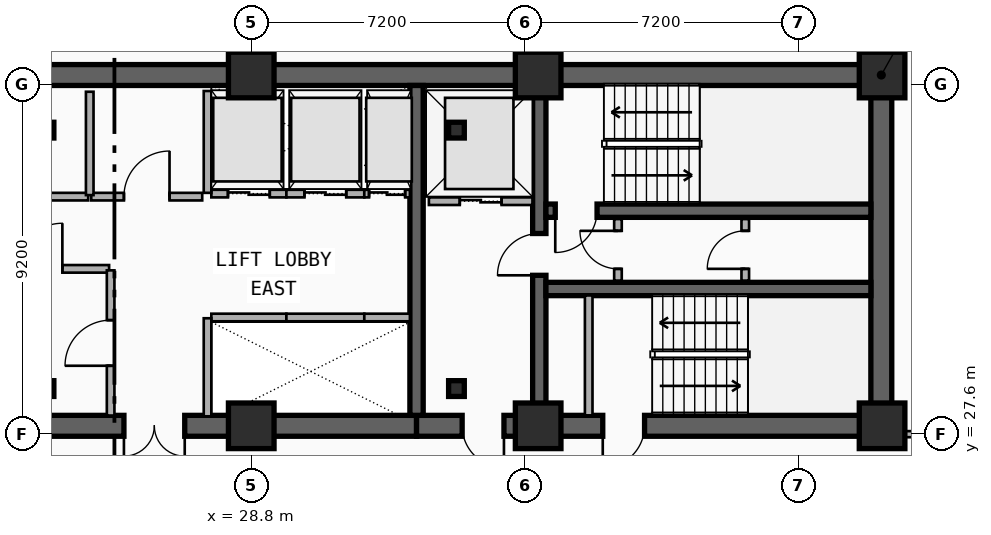
"""IFC4 building model, lengths in metres.
Left out: names, types, materials, properties, quantities, classifications, styles, units other than length and angle.
Written with IfcOpenShell. Run it as: python <this file> out.ifc"""

import sys

from ifc_helpers import new_model, si_unit, direction, frame, frame_2d, origin, origin_2d, place, context, subcontext, project, spatial, rectangle, i_section, extrude, element, fill, save


model = new_model("IFC4")
c1 = context("Model", 3, precision=1e-05, world=origin(), true_north=direction((0.0, 1.0)))
c2 = subcontext(c1, "Body", "Model", "MODEL_VIEW")
j1 = project(units=[si_unit("LENGTHUNIT", "METRE"), si_unit("PLANEANGLEUNIT", "RADIAN")], contexts=[c1])
p1 = place(None, origin())
s1 = spatial("IfcSite", under=j1, at=p1, CompositionType="ELEMENT")
p2 = place(p1, origin())
s2 = spatial("IfcBuilding", under=s1, at=p2, CompositionType="ELEMENT")
p3 = place(p2, frame((0.0, 0.0, 169.65)))
s3 = spatial("IfcBuildingStorey", under=s2, at=p3, CompositionType="ELEMENT", Elevation=169.65)
p4 = place(p3, frame((12.15, 37.05, 0.0), z_axis=(0.0, 0.0, 1.0), x_axis=(1.0, 0.0, 0.0)))
e1 = element("IfcWall", 1, at=p4, inside=s3, PredefinedType="SHEAR", context=c2, shape_type="SweptSolid", body=[
    extrude(rectangle(XDim=33.23, YDim=0.55, at=frame_2d((16.615, 0.0))), origin(), (0.0, 0.0, 1.0), 3.55),
])
p5 = place(p3, frame((33.15, 27.82, 0.0), z_axis=(0.0, 0.0, 1.0), x_axis=(-1.0, 0.0, 0.0)))
e2 = element("IfcWall", 2, at=p5, inside=s3, PredefinedType="SHEAR", context=c2, shape_type="SweptSolid", body=[
    extrude(rectangle(XDim=11.97, YDim=0.55, at=frame_2d((5.985, 0.0))), origin(), (0.0, 0.0, 1.0), 3.55),
])
p6 = place(p5, frame((6.1, 0.0, 0.0)))
e3 = element("IfcOpeningElement", 3, at=p6, cuts=e2, PredefinedType="OPENING", context=c2, shape_type="SweptSolid", body=[
    extrude(rectangle(XDim=1.6, YDim=2.2, at=frame_2d((0.8, 1.1))), frame((0.0, 0.285, 0.0), z_axis=(0.0, -1.0, 0.0), x_axis=(1.0, 0.0, 0.0)), (0.0, 0.0, 1.0), 0.57),
])
p7 = place(p3, frame((45.38, 27.82, 0.0), z_axis=(0.0, 0.0, 1.0), x_axis=(-1.0, 0.0, 0.0)))
e4 = element("IfcWall", 4, at=p7, inside=s3, PredefinedType="SHEAR", context=c2, shape_type="SweptSolid", body=[
    extrude(rectangle(XDim=12.23, YDim=0.55, at=frame_2d((6.115, 0.0))), origin(), (0.0, 0.0, 1.0), 3.55),
])
p8 = place(p7, frame((9.93, 0.0, 0.0)))
e5 = element("IfcOpeningElement", 5, at=p8, cuts=e4, PredefinedType="OPENING", context=c2, shape_type="SweptSolid", body=[
    extrude(rectangle(XDim=1.1, YDim=2.15, at=frame_2d((0.55, 1.075))), frame((0.0, 0.285, 0.0), z_axis=(0.0, -1.0, 0.0), x_axis=(1.0, 0.0, 0.0)), (0.0, 0.0, 1.0), 0.57),
])
p9 = place(p7, frame((6.23, 0.0, 0.0)))
e6 = element("IfcOpeningElement", 6, at=p9, cuts=e4, PredefinedType="OPENING", context=c2, shape_type="SweptSolid", body=[
    extrude(rectangle(XDim=1.1, YDim=2.15, at=frame_2d((0.55, 1.075))), frame((0.0, 0.285, 0.0), z_axis=(0.0, -1.0, 0.0), x_axis=(1.0, 0.0, 0.0)), (0.0, 0.0, 1.0), 0.57),
])
p10 = place(p3, frame((45.38, 28.095, 0.0), z_axis=(0.0, 0.0, 1.0), x_axis=(0.0, 1.0, 0.0)))
e7 = element("IfcWall", 7, at=p10, inside=s3, PredefinedType="SHEAR", context=c2, shape_type="SweptSolid", body=[
    extrude(rectangle(XDim=8.68, YDim=0.55, at=frame_2d((4.34, 0.0))), origin(), (0.0, 0.0, 1.0), 3.55),
])
p11 = place(p3, frame((33.15, 28.095, 0.0), z_axis=(0.0, 0.0, 1.0), x_axis=(0.0, 1.0, 0.0)))
e8 = element("IfcWall", 8, at=p11, inside=s3, PredefinedType="SHEAR", context=c2, shape_type="SweptSolid", body=[
    extrude(rectangle(XDim=8.68, YDim=0.35, at=frame_2d((4.34, 0.0))), origin(), (0.0, 0.0, 1.0), 3.55),
])
p12 = place(p3, frame((36.38, 28.095, 0.0), z_axis=(0.0, 0.0, 1.0), x_axis=(0.0, 1.0, 0.0)))
e9 = element("IfcWall", 9, at=p12, inside=s3, PredefinedType="SHEAR", context=c2, shape_type="SweptSolid", body=[
    extrude(rectangle(XDim=8.68, YDim=0.35, at=frame_2d((4.34, 0.0))), origin(), (0.0, 0.0, 1.0), 3.55),
])
p13 = place(p12, frame((3.685, 0.0, 0.0)))
e10 = element("IfcOpeningElement", 10, at=p13, cuts=e9, PredefinedType="OPENING", context=c2, shape_type="SweptSolid", body=[
    extrude(rectangle(XDim=1.1, YDim=2.15, at=frame_2d((0.55, 1.075))), frame((0.0, 0.185, 0.0), z_axis=(0.0, -1.0, 0.0), x_axis=(1.0, 0.0, 0.0)), (0.0, 0.0, 1.0), 0.37),
])
p14 = place(p3, frame((45.105, 33.48, 0.0), z_axis=(0.0, 0.0, 1.0), x_axis=(-1.0, 0.0, 0.0)))
e11 = element("IfcWall", 11, at=p14, inside=s3, PredefinedType="SHEAR", context=c2, shape_type="SweptSolid", body=[
    extrude(rectangle(XDim=8.55, YDim=0.35, at=frame_2d((4.275, 0.0))), origin(), (0.0, 0.0, 1.0), 3.55),
])
p15 = place(p14, frame((7.205, 0.0, 0.0)))
e12 = element("IfcOpeningElement", 12, at=p15, cuts=e11, PredefinedType="OPENING", context=c2, shape_type="SweptSolid", body=[
    extrude(rectangle(XDim=1.1, YDim=2.15, at=frame_2d((0.55, 1.075))), frame((0.0, 0.185, 0.0), z_axis=(0.0, -1.0, 0.0), x_axis=(1.0, 0.0, 0.0)), (0.0, 0.0, 1.0), 0.37),
])
p16 = place(p3, frame((36.555, 31.42, 0.0), z_axis=(0.0, 0.0, 1.0), x_axis=(1.0, 0.0, 0.0)))
e13 = element("IfcWall", 13, at=p16, inside=s3, PredefinedType="SHEAR", context=c2, shape_type="SweptSolid", body=[
    extrude(rectangle(XDim=8.55, YDim=0.35, at=frame_2d((4.275, 0.0))), origin(), (0.0, 0.0, 1.0), 3.55),
])
for number, where, z_axis, x_axis in (
    (14, (23.4, 28.8, 0.0), (0.0, 0.0, 1.0), (1.0, 0.0, 0.0)),
    (15, (34.2, 28.8, 0.0), (0.0, 0.0, 1.0), (1.0, 0.0, 0.0)),
    (16, (34.2, 35.6, 0.0), (0.0, 0.0, 1.0), (1.0, 0.0, 0.0)),
    (17, (23.4, 35.6, 0.0), (0.0, 0.0, 1.0), (1.0, 0.0, 0.0)),
):
    element("IfcColumn", number, at=place(p3, frame(where, z_axis=z_axis, x_axis=x_axis)), inside=s3, PredefinedType="COLUMN", context=c2, shape_type="SweptSolid", body=[
        extrude(i_section(OverallWidth=0.413, OverallDepth=0.415, WebThickness=0.03, FlangeThickness=0.047, FilletRadius=0.015, at=origin_2d()), origin(), (0.0, 0.0, 1.0), 3.55),
    ])
for number, where, z_axis, x_axis in (
    (18, (28.8, 27.82, 0.0), (0.0, 0.0, 1.0), (1.0, 0.0, 0.0)),
    (19, (28.8, 37.05, 0.0), (0.0, 0.0, 1.0), (1.0, 0.0, 0.0)),
    (20, (36.35, 27.82, 0.0), (0.0, 0.0, 1.0), (1.0, 0.0, 0.0)),
    (21, (36.35, 37.05, 0.0), (0.0, 0.0, 1.0), (1.0, 0.0, 0.0)),
    (22, (45.4, 27.82, 0.0), (0.0, 0.0, 1.0), (1.0, 0.0, 0.0)),
    (23, (45.4, 37.05, 0.0), (0.0, 0.0, 1.0), (1.0, 0.0, 0.0)),
):
    element("IfcColumn", number, at=place(p3, frame(where, z_axis=z_axis, x_axis=x_axis)), inside=s3, PredefinedType="COLUMN", context=c2, shape_type="SweptSolid", body=[
        extrude(rectangle(XDim=1.2, YDim=1.2, at=origin_2d()), origin(), (0.0, 0.0, 1.0), 3.55),
    ])
p17 = place(p3, frame((33.475, 33.73, 0.0), z_axis=(0.0, 0.0, 1.0), x_axis=(1.0, 0.0, 0.0)))
e24 = element("IfcWall", 24, at=p17, inside=s3, PredefinedType="PARTITIONING", context=c2, shape_type="SweptSolid", body=[
    extrude(rectangle(XDim=2.725, YDim=0.2, at=frame_2d((1.362, 0.0))), origin(), (0.0, 0.0, 1.0), 2.36),
])
p18 = place(p17, frame((0.812, 0.0, 0.0)))
e25 = element("IfcOpeningElement", 25, at=p18, cuts=e24, PredefinedType="OPENING", context=c2, shape_type="SweptSolid", body=[
    extrude(rectangle(XDim=1.1, YDim=2.15, at=frame_2d((0.55, 1.075))), frame((0.0, 0.11, 0.0), z_axis=(0.0, -1.0, 0.0), x_axis=(1.0, 0.0, 0.0)), (0.0, 0.0, 1.0), 0.22),
])
p19 = place(p3, frame((27.75, 30.67, 0.0), z_axis=(0.0, 0.0, 1.0), x_axis=(1.0, 0.0, 0.0)))
e26 = element("IfcWall", 26, at=p19, inside=s3, PredefinedType="PARTITIONING", context=c2, shape_type="SweptSolid", body=[
    extrude(rectangle(XDim=1.975, YDim=0.2, at=frame_2d((0.988, 0.0))), origin(), (0.0, 0.0, 1.0), 2.36),
])
p20 = place(p3, frame((27.65, 28.07, 0.0), z_axis=(0.0, 0.0, 1.0), x_axis=(0.0, 1.0, 0.0)))
e27 = element("IfcWall", 27, at=p20, inside=s3, PredefinedType="PARTITIONING", context=c2, shape_type="SweptSolid", body=[
    extrude(rectangle(XDim=2.58, YDim=0.2, at=frame_2d((1.29, 0.0))), origin(), (0.0, 0.0, 1.0), 2.36),
])
p21 = place(p3, frame((29.725, 30.67, 0.0), z_axis=(0.0, 0.0, 1.0), x_axis=(1.0, 0.0, 0.0)))
e28 = element("IfcWall", 28, at=p21, inside=s3, PredefinedType="PARTITIONING", context=c2, shape_type="SweptSolid", body=[
    extrude(rectangle(XDim=2.05, YDim=0.2, at=frame_2d((1.025, 0.0))), origin(), (0.0, 0.0, 1.0), 2.67),
])
p22 = place(p3, frame((31.775, 30.67, 0.0), z_axis=(0.0, 0.0, 1.0), x_axis=(1.0, 0.0, 0.0)))
e29 = element("IfcWall", 29, at=p22, inside=s3, PredefinedType="PARTITIONING", context=c2, shape_type="SweptSolid", body=[
    extrude(rectangle(XDim=1.2, YDim=0.2, at=frame_2d((0.6, 0.0))), origin(), (0.0, 0.0, 1.0), 2.67),
])
p23 = place(p3, frame((27.75, 33.93, 0.0), z_axis=(0.0, 0.0, 1.0), x_axis=(1.0, 0.0, 0.0)))
e30 = element("IfcWall", 30, at=p23, inside=s3, PredefinedType="PARTITIONING", context=c2, shape_type="SweptSolid", body=[
    extrude(rectangle(XDim=1.975, YDim=0.2, at=frame_2d((0.988, 0.0))), origin(), (0.0, 0.0, 1.0), 2.36),
])
p24 = place(p23, frame((0.438, 0.0, 0.0)))
e31 = element("IfcOpeningElement", 31, at=p24, cuts=e30, PredefinedType="OPENING", context=c2, shape_type="SweptSolid", body=[
    extrude(rectangle(XDim=1.1, YDim=2.15, at=frame_2d((0.55, 1.075))), frame((0.0, 0.11, 0.0), z_axis=(0.0, -1.0, 0.0), x_axis=(1.0, 0.0, 0.0)), (0.0, 0.0, 1.0), 0.22),
])
p25 = place(p3, frame((27.65, 33.95, 0.0), z_axis=(0.0, 0.0, 1.0), x_axis=(0.0, 1.0, 0.0)))
e32 = element("IfcWall", 32, at=p25, inside=s3, PredefinedType="PARTITIONING", context=c2, shape_type="SweptSolid", body=[
    extrude(rectangle(XDim=2.68, YDim=0.2, at=frame_2d((1.34, 0.0))), origin(), (0.0, 0.0, 1.0), 2.36),
])
p26 = place(p3, frame((29.725, 33.93, 0.0), z_axis=(0.0, 0.0, 1.0), x_axis=(1.0, 0.0, 0.0)))
e33 = element("IfcWall", 33, at=p26, inside=s3, PredefinedType="PARTITIONING", context=c2, shape_type="SweptSolid", body=[
    extrude(rectangle(XDim=2.05, YDim=0.2, at=frame_2d((1.025, 0.0))), origin(), (0.0, 0.0, 1.0), 3.29),
])
p27 = place(p26, frame((0.475, 0.0, 0.0)))
e34 = element("IfcOpeningElement", 34, at=p27, cuts=e33, PredefinedType="OPENING", context=c2, shape_type="SweptSolid", body=[
    extrude(rectangle(XDim=1.1, YDim=2.15, at=frame_2d((0.55, 1.075))), frame((0.0, 0.11, 0.0), z_axis=(0.0, -1.0, 0.0), x_axis=(1.0, 0.0, 0.0)), (0.0, 0.0, 1.0), 0.22),
])
p28 = place(p3, frame((31.775, 33.93, 0.0), z_axis=(0.0, 0.0, 1.0), x_axis=(1.0, 0.0, 0.0)))
e35 = element("IfcWall", 35, at=p28, inside=s3, PredefinedType="PARTITIONING", context=c2, shape_type="SweptSolid", body=[
    extrude(rectangle(XDim=1.2, YDim=0.2, at=frame_2d((0.6, 0.0))), origin(), (0.0, 0.0, 1.0), 3.29),
])
p29 = place(p28, frame((0.125, 0.0, 0.0)))
e36 = element("IfcOpeningElement", 36, at=p29, cuts=e35, PredefinedType="OPENING", context=c2, shape_type="SweptSolid", body=[
    extrude(rectangle(XDim=0.95, YDim=2.15, at=frame_2d((0.475, 1.075))), frame((0.0, 0.11, 0.0), z_axis=(0.0, -1.0, 0.0), x_axis=(1.0, 0.0, 0.0)), (0.0, 0.0, 1.0), 0.22),
])
p30 = place(p3, frame((37.68, 28.095, 0.0), z_axis=(0.0, 0.0, 1.0), x_axis=(0.0, 1.0, 0.0)))
e37 = element("IfcWall", 37, at=p30, inside=s3, PredefinedType="PARTITIONING", context=c2, shape_type="SweptSolid", body=[
    extrude(rectangle(XDim=3.155, YDim=0.2, at=frame_2d((1.578, 0.0))), origin(), (0.0, 0.0, 1.0), 2.67),
])
p31 = place(p3, frame((38.45, 31.64, 0.0), z_axis=(0.0, 0.0, 1.0), x_axis=(0.0, 1.0, 0.0)))
e38 = element("IfcWall", 38, at=p31, inside=s3, PredefinedType="PARTITIONING", context=c2, shape_type="SweptSolid", body=[
    extrude(rectangle(XDim=1.62, YDim=0.2, at=frame_2d((0.81, 0.0))), origin(), (0.0, 0.0, 1.0), 3.29),
])
p32 = place(p31, frame((0.31, 0.0, 0.0)))
e39 = element("IfcOpeningElement", 39, at=p32, cuts=e38, PredefinedType="OPENING", context=c2, shape_type="SweptSolid", body=[
    extrude(rectangle(XDim=1.0, YDim=2.15, at=frame_2d((0.5, 1.075))), frame((0.0, 0.11, 0.0), z_axis=(0.0, -1.0, 0.0), x_axis=(1.0, 0.0, 0.0)), (0.0, 0.0, 1.0), 0.22),
])
p33 = place(p3, frame((41.8, 31.64, 0.0), z_axis=(0.0, 0.0, 1.0), x_axis=(0.0, 1.0, 0.0)))
e40 = element("IfcWall", 40, at=p33, inside=s3, PredefinedType="PARTITIONING", context=c2, shape_type="SweptSolid", body=[
    extrude(rectangle(XDim=1.62, YDim=0.2, at=frame_2d((0.81, 0.0))), origin(), (0.0, 0.0, 1.0), 3.29),
])
p34 = place(p33, frame((0.31, 0.0, 0.0)))
e41 = element("IfcOpeningElement", 41, at=p34, cuts=e40, PredefinedType="OPENING", context=c2, shape_type="SweptSolid", body=[
    extrude(rectangle(XDim=1.0, YDim=2.15, at=frame_2d((0.5, 1.075))), frame((0.0, 0.11, 0.0), z_axis=(0.0, -1.0, 0.0), x_axis=(1.0, 0.0, 0.0)), (0.0, 0.0, 1.0), 0.22),
])
p35 = place(p3, frame((21.4, 31.95, 0.0), z_axis=(0.0, 0.0, 1.0), x_axis=(1.0, 0.0, 0.0)))
e42 = element("IfcWall", 42, at=p35, inside=s3, PredefinedType="PARTITIONING", context=c2, shape_type="SweptSolid", body=[
    extrude(rectangle(XDim=3.66, YDim=0.2, at=frame_2d((1.83, 0.0))), origin(), (0.0, 0.0, 1.0), 2.36),
])
p36 = place(p35, frame((1.23, 0.0, 0.0)))
e43 = element("IfcOpeningElement", 43, at=p36, cuts=e42, PredefinedType="OPENING", context=c2, shape_type="SweptSolid", body=[
    extrude(rectangle(XDim=1.2, YDim=2.15, at=frame_2d((0.6, 1.075))), frame((0.0, 0.11, 0.0), z_axis=(0.0, -1.0, 0.0), x_axis=(1.0, 0.0, 0.0)), (0.0, 0.0, 1.0), 0.22),
])
p37 = place(p3, frame((21.59, 33.85, 0.0), z_axis=(0.0, 0.0, 1.0), x_axis=(1.0, 0.0, 0.0)))
e44 = element("IfcWall", 44, at=p37, inside=s3, PredefinedType="PARTITIONING", context=c2, shape_type="SweptSolid", body=[
    extrude(rectangle(XDim=2.92, YDim=0.2, at=frame_2d((1.46, 0.0))), origin(), (0.0, 0.0, 1.0), 2.36),
])
p38 = place(p37, frame((0.2, 0.0, 0.0)))
e45 = element("IfcOpeningElement", 45, at=p38, cuts=e44, PredefinedType="OPENING", context=c2, shape_type="SweptSolid", body=[
    extrude(rectangle(XDim=1.2, YDim=2.15, at=frame_2d((0.6, 1.075))), frame((0.0, 0.11, 0.0), z_axis=(0.0, -1.0, 0.0), x_axis=(1.0, 0.0, 0.0)), (0.0, 0.0, 1.0), 0.22),
])
p39 = place(p3, frame((24.59, 33.85, 0.0), z_axis=(0.0, 0.0, 1.0), x_axis=(1.0, 0.0, 0.0)))
e46 = element("IfcWall", 46, at=p39, inside=s3, PredefinedType="PARTITIONING", context=c2, shape_type="SweptSolid", body=[
    extrude(rectangle(XDim=2.92, YDim=0.2, at=frame_2d((1.46, 0.0))), origin(), (0.0, 0.0, 1.0), 3.29),
])
p40 = place(p39, frame((0.86, 0.0, 0.0)))
e47 = element("IfcOpeningElement", 47, at=p40, cuts=e46, PredefinedType="OPENING", context=c2, shape_type="SweptSolid", body=[
    extrude(rectangle(XDim=1.2, YDim=2.15, at=frame_2d((0.6, 1.075))), frame((0.0, 0.11, 0.0), z_axis=(0.0, -1.0, 0.0), x_axis=(1.0, 0.0, 0.0)), (0.0, 0.0, 1.0), 0.22),
])
p41 = place(p3, frame((25.1, 28.09, 0.0), z_axis=(0.0, 0.0, 1.0), x_axis=(0.0, 1.0, 0.0)))
e48 = element("IfcWall", 48, at=p41, inside=s3, PredefinedType="PARTITIONING", context=c2, shape_type="SweptSolid", body=[
    extrude(rectangle(XDim=3.82, YDim=0.2, at=frame_2d((1.91, 0.0))), origin(), (0.0, 0.0, 1.0), 2.67),
])
p42 = place(p41, frame((1.31, 0.0, 0.0)))
e49 = element("IfcOpeningElement", 49, at=p42, cuts=e48, PredefinedType="OPENING", context=c2, shape_type="SweptSolid", body=[
    extrude(rectangle(XDim=1.2, YDim=2.15, at=frame_2d((0.6, 1.075))), frame((0.0, 0.11, 0.0), z_axis=(0.0, -1.0, 0.0), x_axis=(1.0, 0.0, 0.0)), (0.0, 0.0, 1.0), 0.22),
])
p43 = place(p3, frame((24.55, 33.89, 0.0), z_axis=(0.0, 0.0, 1.0), x_axis=(0.0, 1.0, 0.0)))
e50 = element("IfcWall", 50, at=p43, inside=s3, PredefinedType="PARTITIONING", context=c2, shape_type="SweptSolid", body=[
    extrude(rectangle(XDim=2.72, YDim=0.2, at=frame_2d((1.36, 0.0))), origin(), (0.0, 0.0, 1.0), 3.29),
])
p44 = place(p3, frame((45.41, 27.6, 0.0), z_axis=(0.0, 0.0, 1.0), x_axis=(1.0, 0.0, 0.0)))
e51 = element("IfcWall", 51, at=p44, inside=s3, PredefinedType="PARTITIONING", context=c2, shape_type="SweptSolid", body=[
    extrude(rectangle(XDim=0.91, YDim=0.16, at=frame_2d((0.455, 0.0))), origin(), (0.0, 0.0, 1.0), 2.36),
])
p45 = place(p18, origin())
e52 = element("IfcDoor", 52, at=p45, inside=s3, OperationType="DOUBLE_DOOR_SLIDING", PredefinedType="DOOR", context=c2, shape_type="SweptSolid", body=[
    extrude(rectangle(XDim=1.1, YDim=2.15, at=frame_2d((0.55, 1.075))), frame((0.0, 0.025, 0.0), z_axis=(0.0, -1.0, 0.0), x_axis=(1.0, 0.0, 0.0)), (0.0, 0.0, 1.0), 0.05),
])
fill(e25, e52)
p46 = place(p24, origin())
e53 = element("IfcDoor", 53, at=p46, inside=s3, OperationType="DOUBLE_DOOR_SLIDING", PredefinedType="DOOR", context=c2, shape_type="SweptSolid", body=[
    extrude(rectangle(XDim=1.1, YDim=2.15, at=frame_2d((0.55, 1.075))), frame((0.0, 0.025, 0.0), z_axis=(0.0, -1.0, 0.0), x_axis=(1.0, 0.0, 0.0)), (0.0, 0.0, 1.0), 0.05),
])
fill(e31, e53)
p47 = place(p27, origin())
e54 = element("IfcDoor", 54, at=p47, inside=s3, OperationType="DOUBLE_DOOR_SLIDING", PredefinedType="DOOR", context=c2, shape_type="SweptSolid", body=[
    extrude(rectangle(XDim=1.1, YDim=2.15, at=frame_2d((0.55, 1.075))), frame((0.0, 0.025, 0.0), z_axis=(0.0, -1.0, 0.0), x_axis=(1.0, 0.0, 0.0)), (0.0, 0.0, 1.0), 0.05),
])
fill(e34, e54)
p48 = place(p29, origin())
e55 = element("IfcDoor", 55, at=p48, inside=s3, OperationType="DOUBLE_DOOR_SLIDING", PredefinedType="DOOR", context=c2, shape_type="SweptSolid", body=[
    extrude(rectangle(XDim=0.95, YDim=2.15, at=frame_2d((0.475, 1.075))), frame((0.0, 0.025, 0.0), z_axis=(0.0, -1.0, 0.0), x_axis=(1.0, 0.0, 0.0)), (0.0, 0.0, 1.0), 0.05),
])
fill(e36, e55)
p49 = place(p15, origin())
e56 = element("IfcDoor", 56, at=p49, inside=s3, OperationType="SINGLE_SWING_RIGHT", PredefinedType="DOOR", context=c2, shape_type="SweptSolid", body=[
    extrude(rectangle(XDim=1.1, YDim=2.15, at=frame_2d((0.55, 1.075))), frame((0.0, 0.025, 0.0), z_axis=(0.0, -1.0, 0.0), x_axis=(1.0, 0.0, 0.0)), (0.0, 0.0, 1.0), 0.05),
])
fill(e12, e56)
p50 = place(p13, origin())
e57 = element("IfcDoor", 57, at=p50, inside=s3, OperationType="SINGLE_SWING_LEFT", PredefinedType="DOOR", context=c2, shape_type="SweptSolid", body=[
    extrude(rectangle(XDim=1.1, YDim=2.15, at=frame_2d((0.55, 1.075))), frame((0.0, 0.025, 0.0), z_axis=(0.0, -1.0, 0.0), x_axis=(1.0, 0.0, 0.0)), (0.0, 0.0, 1.0), 0.05),
])
fill(e10, e57)
p51 = place(p8, origin())
e58 = element("IfcDoor", 58, at=p51, inside=s3, OperationType="SINGLE_SWING_LEFT", PredefinedType="DOOR", context=c2, shape_type="SweptSolid", body=[
    extrude(rectangle(XDim=1.1, YDim=2.15, at=frame_2d((0.55, 1.075))), frame((0.0, 0.025, 0.0), z_axis=(0.0, -1.0, 0.0), x_axis=(1.0, 0.0, 0.0)), (0.0, 0.0, 1.0), 0.05),
])
fill(e5, e58)
p52 = place(p9, origin())
e59 = element("IfcDoor", 59, at=p52, inside=s3, OperationType="SINGLE_SWING_RIGHT", PredefinedType="DOOR", context=c2, shape_type="SweptSolid", body=[
    extrude(rectangle(XDim=1.1, YDim=2.15, at=frame_2d((0.55, 1.075))), frame((0.0, 0.025, 0.0), z_axis=(0.0, -1.0, 0.0), x_axis=(1.0, 0.0, 0.0)), (0.0, 0.0, 1.0), 0.05),
])
fill(e6, e59)
p53 = place(p6, origin())
e60 = element("IfcDoor", 60, at=p53, inside=s3, OperationType="SINGLE_SWING_LEFT", PredefinedType="DOOR", context=c2, shape_type="SweptSolid", body=[
    extrude(rectangle(XDim=1.6, YDim=2.2, at=frame_2d((0.8, 1.1))), frame((0.0, 0.025, 0.0), z_axis=(0.0, -1.0, 0.0), x_axis=(1.0, 0.0, 0.0)), (0.0, 0.0, 1.0), 0.05),
])
fill(e3, e60)
p54 = place(p32, origin())
e61 = element("IfcDoor", 61, at=p54, inside=s3, OperationType="SINGLE_SWING_RIGHT", PredefinedType="DOOR", context=c2, shape_type="SweptSolid", body=[
    extrude(rectangle(XDim=1.0, YDim=2.15, at=frame_2d((0.5, 1.075))), frame((0.0, 0.025, 0.0), z_axis=(0.0, -1.0, 0.0), x_axis=(1.0, 0.0, 0.0)), (0.0, 0.0, 1.0), 0.05),
])
fill(e39, e61)
p55 = place(p34, origin())
e62 = element("IfcDoor", 62, at=p55, inside=s3, OperationType="SINGLE_SWING_LEFT", PredefinedType="DOOR", context=c2, shape_type="SweptSolid", body=[
    extrude(rectangle(XDim=1.0, YDim=2.15, at=frame_2d((0.5, 1.075))), frame((0.0, 0.025, 0.0), z_axis=(0.0, -1.0, 0.0), x_axis=(1.0, 0.0, 0.0)), (0.0, 0.0, 1.0), 0.05),
])
fill(e41, e62)
p56 = place(p36, origin())
e63 = element("IfcDoor", 63, at=p56, inside=s3, OperationType="SINGLE_SWING_RIGHT", PredefinedType="DOOR", context=c2, shape_type="SweptSolid", body=[
    extrude(rectangle(XDim=1.2, YDim=2.15, at=frame_2d((0.6, 1.075))), frame((0.0, 0.025, 0.0), z_axis=(0.0, -1.0, 0.0), x_axis=(1.0, 0.0, 0.0)), (0.0, 0.0, 1.0), 0.05),
])
fill(e43, e63)
p57 = place(p40, origin())
e64 = element("IfcDoor", 64, at=p57, inside=s3, OperationType="SINGLE_SWING_RIGHT", PredefinedType="DOOR", context=c2, shape_type="SweptSolid", body=[
    extrude(rectangle(XDim=1.2, YDim=2.15, at=frame_2d((0.6, 1.075))), frame((0.0, 0.025, 0.0), z_axis=(0.0, -1.0, 0.0), x_axis=(1.0, 0.0, 0.0)), (0.0, 0.0, 1.0), 0.05),
])
fill(e47, e64)
p58 = place(p42, origin())
e65 = element("IfcDoor", 65, at=p58, inside=s3, OperationType="SINGLE_SWING_LEFT", PredefinedType="DOOR", context=c2, shape_type="SweptSolid", body=[
    extrude(rectangle(XDim=1.2, YDim=2.15, at=frame_2d((0.6, 1.075))), frame((0.0, 0.025, 0.0), z_axis=(0.0, -1.0, 0.0), x_axis=(1.0, 0.0, 0.0)), (0.0, 0.0, 1.0), 0.05),
])
fill(e49, e65)
save(model, sys.argv[1])
